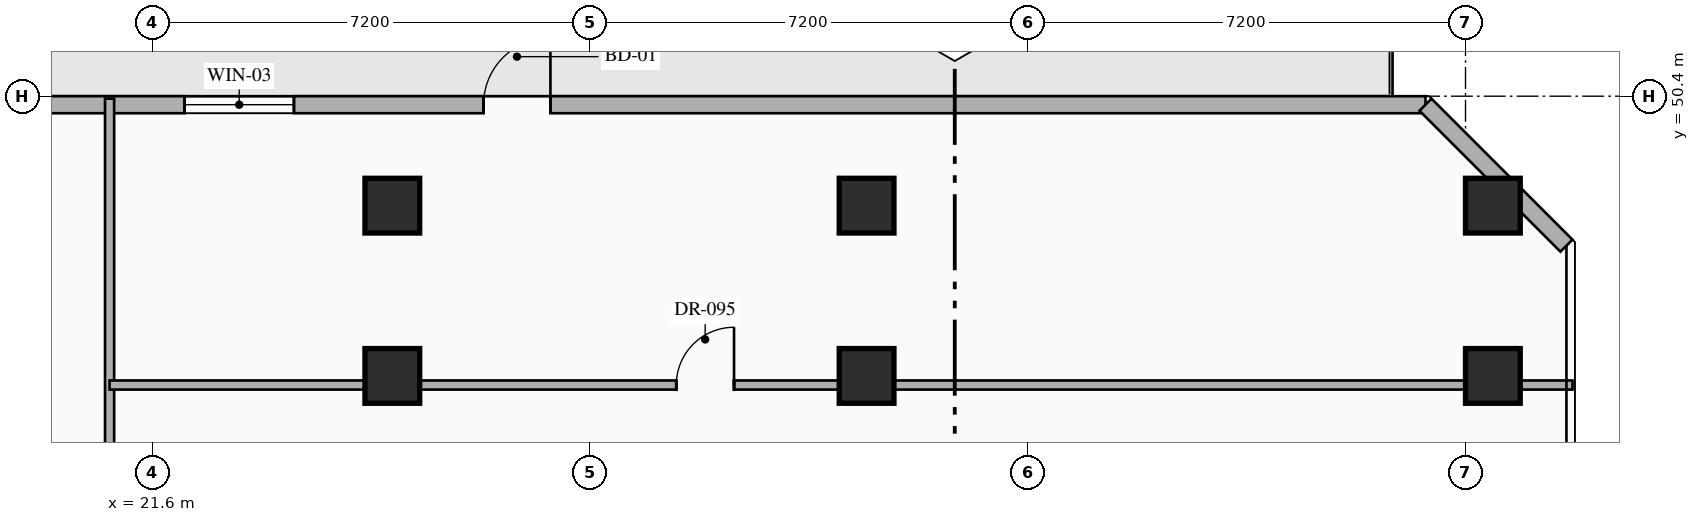
"""IFC4 building model, lengths in metres.
Left out: names, types, materials, properties, quantities, classifications, styles, units other than length and angle.
Written with IfcOpenShell. Run it as: python <this file> out.ifc"""

import sys

from ifc_helpers import new_model, si_unit, direction, frame, frame_2d, origin, origin_2d, place, context, subcontext, project, spatial, rectangle, hollow_rectangle, extrude, element, fill, save


model = new_model("IFC4")
c1 = context("Model", 3, precision=1e-05, world=origin(), true_north=direction((0.0, 1.0)))
c2 = subcontext(c1, "Body", "Model", "MODEL_VIEW")
j1 = project(units=[si_unit("LENGTHUNIT", "METRE"), si_unit("PLANEANGLEUNIT", "RADIAN")], contexts=[c1])
p1 = place(None, origin())
s1 = spatial("IfcSite", under=j1, at=p1, CompositionType="ELEMENT")
p2 = place(p1, origin())
s2 = spatial("IfcBuilding", under=s1, at=p2, CompositionType="ELEMENT")
p3 = place(p2, frame((0.0, 0.0, 126.45)))
s3 = spatial("IfcBuildingStorey", under=s2, at=p3, CompositionType="ELEMENT", Elevation=126.45)
for number, where, z_axis, x_axis in (
    (1, (25.55, 45.8, 0.0), (0.0, 0.0, 1.0), (1.0, 0.0, 0.0)),
    (2, (33.35, 45.8, 0.0), (0.0, 0.0, 1.0), (1.0, 0.0, 0.0)),
    (3, (43.65, 45.8, 0.0), (0.0, 0.0, 1.0), (1.0, 0.0, 0.0)),
    (4, (25.55, 48.6, 0.0), (0.0, 0.0, 1.0), (1.0, 0.0, 0.0)),
    (5, (33.35, 48.6, 0.0), (0.0, 0.0, 1.0), (1.0, 0.0, 0.0)),
    (6, (43.65, 48.6, 0.0), (0.0, 0.0, 1.0), (1.0, 0.0, 0.0)),
):
    element("IfcColumn", number, at=place(p3, frame(where, z_axis=z_axis, x_axis=x_axis)), inside=s3, PredefinedType="COLUMN", context=c2, shape_type="SweptSolid", body=[
        extrude(hollow_rectangle(XDim=0.9, YDim=0.9, WallThickness=0.036, at=origin_2d()), origin(), (0.0, 0.0, 1.0), 3.6),
    ])
p4 = place(p3, frame((12.058, 50.26, 0.0), z_axis=(0.0, 0.0, 1.0), x_axis=(1.0, 0.0, 0.0)))
e7 = element("IfcWall", 7, at=p4, inside=s3, PredefinedType="STANDARD", context=c2, shape_type="SweptSolid", body=[
    extrude(rectangle(XDim=30.484, YDim=0.28, at=frame_2d((15.242, 0.0))), origin(), (0.0, 0.0, 1.0), 3.34),
])
p5 = place(p4, frame((14.992, 0.0, 0.0)))
e8 = element("IfcOpeningElement", 8, at=p5, cuts=e7, PredefinedType="OPENING", context=c2, shape_type="SweptSolid", body=[
    extrude(rectangle(XDim=1.1, YDim=2.2, at=frame_2d((0.55, 1.1))), frame((0.0, 0.15, 0.0), z_axis=(0.0, -1.0, 0.0), x_axis=(1.0, 0.0, 0.0)), (0.0, 0.0, 1.0), 0.3),
])
p6 = place(p4, frame((10.074, 0.0, 0.85)))
e9 = element("IfcOpeningElement", 9, at=p6, cuts=e7, PredefinedType="OPENING", context=c2, shape_type="SweptSolid", body=[
    extrude(rectangle(XDim=1.8, YDim=2.1, at=frame_2d((0.9, 1.05))), frame((0.0, 0.15, 0.0), z_axis=(0.0, -1.0, 0.0), x_axis=(1.0, 0.0, 0.0)), (0.0, 0.0, 1.0), 0.3),
])
p7 = place(p3, frame((42.542, 50.26, 0.0), z_axis=(0.0, 0.0, 1.0), x_axis=(0.707106781187, -0.707106781187, 0.0)))
e10 = element("IfcWall", 10, at=p7, inside=s3, PredefinedType="STANDARD", context=c2, shape_type="SweptSolid", body=[
    extrude(rectangle(XDim=3.278, YDim=0.28, at=frame_2d((1.639, 0.0))), origin(), (0.0, 0.0, 1.0), 3.34),
])
p8 = place(p3, frame((20.9, 23.44, 0.0), z_axis=(0.0, 0.0, 1.0), x_axis=(0.0, 1.0, 0.0)))
e11 = element("IfcWall", 11, at=p8, inside=s3, PredefinedType="PARTITIONING", context=c2, shape_type="SweptSolid", body=[
    extrude(rectangle(XDim=26.92, YDim=0.15, at=frame_2d((13.46, 0.0))), origin(), (0.0, 0.0, 1.0), 3.34),
])
p9 = place(p8, frame((7.943, 0.0, 0.0)))
e12 = element("IfcOpeningElement", 12, at=p9, cuts=e11, PredefinedType="OPENING", context=c2, shape_type="SweptSolid", body=[
    extrude(rectangle(XDim=0.95, YDim=2.15, at=frame_2d((0.475, 1.075))), frame((0.0, 0.085, 0.0), z_axis=(0.0, -1.0, 0.0), x_axis=(1.0, 0.0, 0.0)), (0.0, 0.0, 1.0), 0.17),
])
p10 = place(p3, frame((20.9, 45.65, 0.0), z_axis=(0.0, 0.0, 1.0), x_axis=(1.0, 0.0, 0.0)))
e13 = element("IfcWall", 13, at=p10, inside=s3, PredefinedType="PARTITIONING", context=c2, shape_type="SweptSolid", body=[
    extrude(rectangle(XDim=24.06, YDim=0.15, at=frame_2d((12.03, 0.0))), origin(), (0.0, 0.0, 1.0), 2.695),
])
p11 = place(p10, frame((9.32, 0.0, 0.0)))
e14 = element("IfcOpeningElement", 14, at=p11, cuts=e13, PredefinedType="OPENING", context=c2, shape_type="SweptSolid", body=[
    extrude(rectangle(XDim=0.95, YDim=2.15, at=frame_2d((0.475, 1.075))), frame((0.0, 0.085, 0.0), z_axis=(0.0, -1.0, 0.0), x_axis=(1.0, 0.0, 0.0)), (0.0, 0.0, 1.0), 0.17),
])
p12 = place(p5, origin())
e15 = element("IfcDoor", 15, at=p12, inside=s3, OperationType="SINGLE_SWING_RIGHT", PredefinedType="DOOR", context=c2, shape_type="SweptSolid", body=[
    extrude(rectangle(XDim=1.1, YDim=2.2, at=frame_2d((0.55, 1.1))), frame((0.0, 0.025, 0.0), z_axis=(0.0, -1.0, 0.0), x_axis=(1.0, 0.0, 0.0)), (0.0, 0.0, 1.0), 0.05),
])
fill(e8, e15)
p13 = place(p6, origin())
e16 = element("IfcWindow", 16, at=p13, inside=s3, PartitioningType="SINGLE_PANEL", PredefinedType="WINDOW", context=c2, shape_type="SweptSolid", body=[
    extrude(rectangle(XDim=1.8, YDim=2.1, at=frame_2d((0.9, 1.05))), frame((0.0, 0.03, 0.0), z_axis=(0.0, -1.0, 0.0), x_axis=(1.0, 0.0, 0.0)), (0.0, 0.0, 1.0), 0.06),
])
fill(e9, e16)
p14 = place(p11, origin())
e17 = element("IfcDoor", 17, at=p14, inside=s3, OperationType="SINGLE_SWING_RIGHT", PredefinedType="DOOR", context=c2, shape_type="SweptSolid", body=[
    extrude(rectangle(XDim=0.95, YDim=2.15, at=frame_2d((0.475, 1.075))), frame((0.0, 0.025, 0.0), z_axis=(0.0, -1.0, 0.0), x_axis=(1.0, 0.0, 0.0)), (0.0, 0.0, 1.0), 0.05),
])
fill(e14, e17)
save(model, sys.argv[1])
